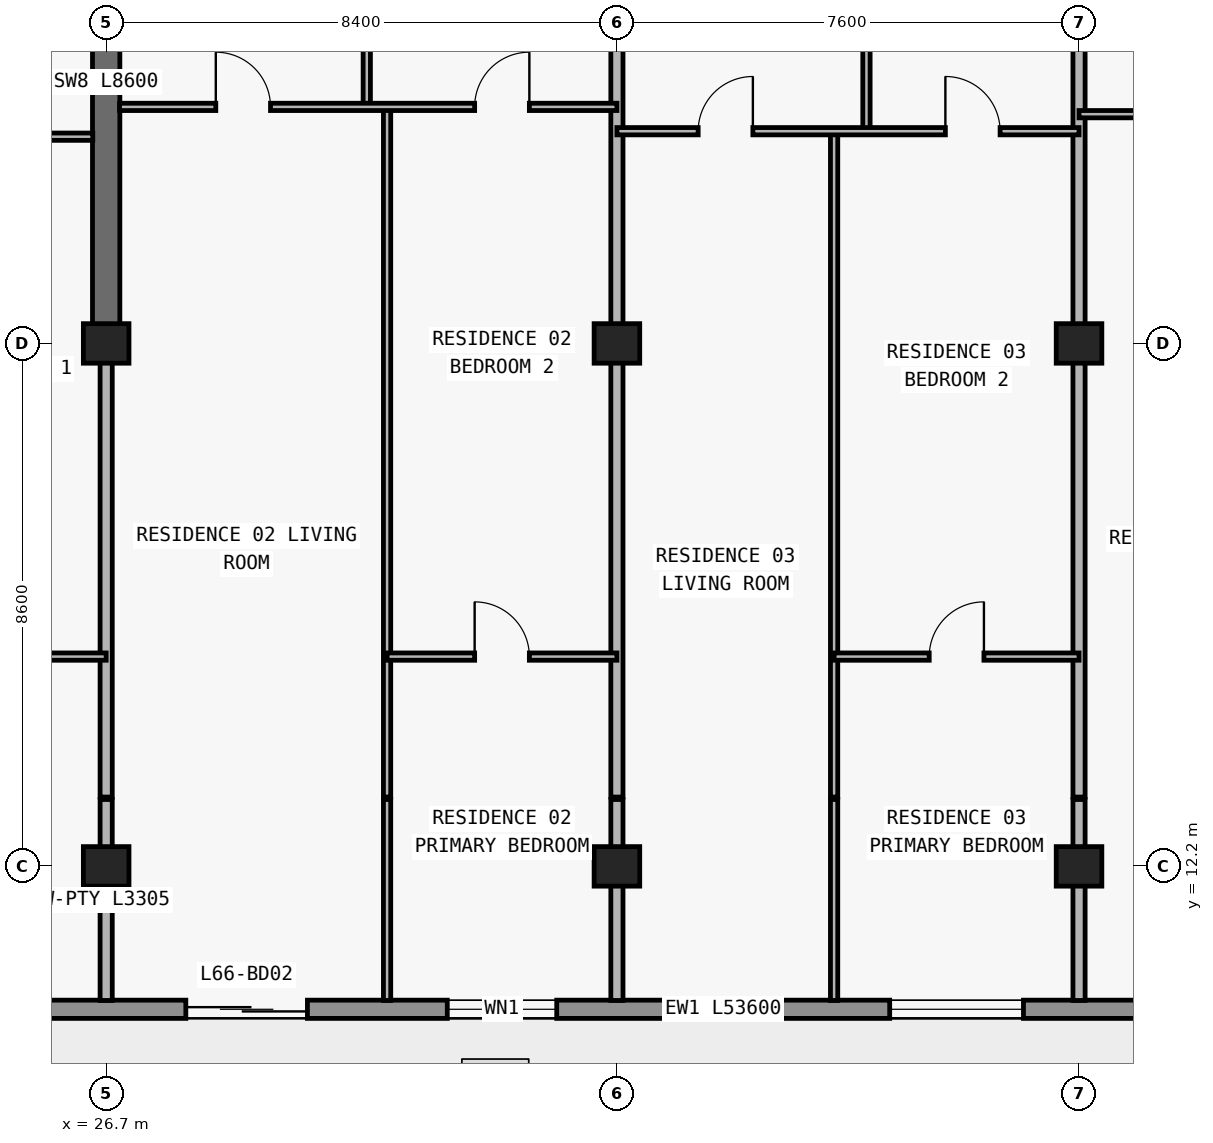
"""IFC4 building model, lengths in metres.
Left out: names, types, materials, properties, quantities, classifications, styles, units other than length and angle.
Written with IfcOpenShell. Run it as: python <this file> out.ifc"""

import sys

from ifc_helpers import new_model, si_unit, direction, frame, frame_2d, origin, origin_2d, place, context, subcontext, project, spatial, rectangle, extrude, element, fill, save


model = new_model("IFC4")
c1 = context("Model", 3, precision=1e-05, world=origin(), true_north=direction((0.0, 1.0)))
c2 = subcontext(c1, "Body", "Model", "MODEL_VIEW")
j1 = project(units=[si_unit("LENGTHUNIT", "METRE"), si_unit("PLANEANGLEUNIT", "RADIAN")], contexts=[c1])
p1 = place(None, origin())
s1 = spatial("IfcSite", under=j1, at=p1, CompositionType="ELEMENT")
p2 = place(p1, origin())
s2 = spatial("IfcBuilding", under=s1, at=p2, CompositionType="ELEMENT")
p3 = place(p2, frame((0.0, 0.0, 236.4)))
s3 = spatial("IfcBuildingStorey", under=s2, at=p3, CompositionType="ELEMENT", Elevation=236.4)
for number, where, z_axis, x_axis in (
    (1, (26.7, 12.2, 0.0), (0.0, 0.0, 1.0), (1.0, 0.0, 0.0)),
    (2, (35.1, 12.2, 0.0), (0.0, 0.0, 1.0), (1.0, 0.0, 0.0)),
    (3, (42.7, 12.2, 0.0), (0.0, 0.0, 1.0), (1.0, 0.0, 0.0)),
    (4, (26.7, 20.8, 0.0), (0.0, 0.0, 1.0), (1.0, 0.0, 0.0)),
    (5, (35.1, 20.8, 0.0), (0.0, 0.0, 1.0), (1.0, 0.0, 0.0)),
    (6, (42.7, 20.8, 0.0), (0.0, 0.0, 1.0), (1.0, 0.0, 0.0)),
):
    element("IfcColumn", number, at=place(p3, frame(where, z_axis=z_axis, x_axis=x_axis)), inside=s3, PredefinedType="COLUMN", context=c2, shape_type="SweptSolid", body=[
        extrude(rectangle(XDim=0.75, YDim=0.65, at=origin_2d()), origin(), (0.0, 0.0, 1.0), 3.05),
    ])
p4 = place(p3, frame((26.7, 20.8, 0.0), z_axis=(0.0, 0.0, 1.0), x_axis=(0.0, 1.0, 0.0)))
e7 = element("IfcWall", 7, at=p4, inside=s3, PredefinedType="SHEAR", context=c2, shape_type="SweptSolid", body=[
    extrude(rectangle(XDim=8.6, YDim=0.45, at=frame_2d((4.3, 0.0))), origin(), (0.0, 0.0, 1.0), 3.05),
])
p5 = place(p3, frame((65.7, 9.85, 0.0), z_axis=(0.0, 0.0, 1.0), x_axis=(-1.0, 0.0, 0.0)))
e8 = element("IfcWall", 8, at=p5, inside=s3, PredefinedType="STANDARD", context=c2, shape_type="SweptSolid", body=[
    extrude(rectangle(XDim=53.6, YDim=0.3, at=frame_2d((26.8, 0.0))), origin(), (0.0, 0.0, 1.0), 3.05),
])
p6 = place(p5, frame((49.5, 0.0, 0.0)))
e9 = element("IfcOpeningElement", 9, at=p6, cuts=e8, PredefinedType="OPENING", context=c2, shape_type="SweptSolid", body=[
    extrude(rectangle(XDim=2.0, YDim=2.3, at=frame_2d((1.0, 1.15))), frame((0.0, 0.16, 0.0), z_axis=(0.0, -1.0, 0.0), x_axis=(1.0, 0.0, 0.0)), (0.0, 0.0, 1.0), 0.32),
])
p7 = place(p5, frame((42.1, 0.0, 0.85)))
e10 = element("IfcOpeningElement", 10, at=p7, cuts=e8, PredefinedType="OPENING", context=c2, shape_type="SweptSolid", body=[
    extrude(rectangle(XDim=2.2, YDim=1.55, at=frame_2d((1.1, 0.775))), frame((0.0, 0.16, 0.0), z_axis=(0.0, -1.0, 0.0), x_axis=(1.0, 0.0, 0.0)), (0.0, 0.0, 1.0), 0.32),
])
p8 = place(p5, frame((35.69, 0.0, 0.0)))
e11 = element("IfcOpeningElement", 11, at=p8, cuts=e8, PredefinedType="OPENING", context=c2, shape_type="SweptSolid", body=[
    extrude(rectangle(XDim=2.0, YDim=2.3, at=frame_2d((1.0, 1.15))), frame((0.0, 0.16, 0.0), z_axis=(0.0, -1.0, 0.0), x_axis=(1.0, 0.0, 0.0)), (0.0, 0.0, 1.0), 0.32),
])
p9 = place(p5, frame((31.59, 0.0, 0.85)))
e12 = element("IfcOpeningElement", 12, at=p9, cuts=e8, PredefinedType="OPENING", context=c2, shape_type="SweptSolid", body=[
    extrude(rectangle(XDim=1.8, YDim=1.55, at=frame_2d((0.9, 0.775))), frame((0.0, 0.16, 0.0), z_axis=(0.0, -1.0, 0.0), x_axis=(1.0, 0.0, 0.0)), (0.0, 0.0, 1.0), 0.32),
])
p10 = place(p5, frame((23.914, 0.0, 0.85)))
e13 = element("IfcOpeningElement", 13, at=p10, cuts=e8, PredefinedType="OPENING", context=c2, shape_type="SweptSolid", body=[
    extrude(rectangle(XDim=2.2, YDim=1.55, at=frame_2d((1.1, 0.775))), frame((0.0, 0.16, 0.0), z_axis=(0.0, -1.0, 0.0), x_axis=(1.0, 0.0, 0.0)), (0.0, 0.0, 1.0), 0.32),
])
p11 = place(p5, frame((19.69, 0.0, 0.0)))
e14 = element("IfcOpeningElement", 14, at=p11, cuts=e8, PredefinedType="OPENING", context=c2, shape_type="SweptSolid", body=[
    extrude(rectangle(XDim=2.0, YDim=2.3, at=frame_2d((1.0, 1.15))), frame((0.0, 0.16, 0.0), z_axis=(0.0, -1.0, 0.0), x_axis=(1.0, 0.0, 0.0)), (0.0, 0.0, 1.0), 0.32),
])
p12 = place(p5, frame((15.59, 0.0, 0.85)))
e15 = element("IfcOpeningElement", 15, at=p12, cuts=e8, PredefinedType="OPENING", context=c2, shape_type="SweptSolid", body=[
    extrude(rectangle(XDim=1.8, YDim=1.55, at=frame_2d((0.9, 0.775))), frame((0.0, 0.16, 0.0), z_axis=(0.0, -1.0, 0.0), x_axis=(1.0, 0.0, 0.0)), (0.0, 0.0, 1.0), 0.32),
])
p13 = place(p5, frame((11.69, 0.0, 0.0)))
e16 = element("IfcOpeningElement", 16, at=p13, cuts=e8, PredefinedType="OPENING", context=c2, shape_type="SweptSolid", body=[
    extrude(rectangle(XDim=2.0, YDim=2.3, at=frame_2d((1.0, 1.15))), frame((0.0, 0.16, 0.0), z_axis=(0.0, -1.0, 0.0), x_axis=(1.0, 0.0, 0.0)), (0.0, 0.0, 1.0), 0.32),
])
p14 = place(p5, frame((7.01, 0.0, 0.65)))
e17 = element("IfcOpeningElement", 17, at=p14, cuts=e8, PredefinedType="OPENING", context=c2, shape_type="SweptSolid", body=[
    extrude(rectangle(XDim=2.6, YDim=1.85, at=frame_2d((1.3, 0.925))), frame((0.0, 0.16, 0.0), z_axis=(0.0, -1.0, 0.0), x_axis=(1.0, 0.0, 0.0)), (0.0, 0.0, 1.0), 0.32),
])
p15 = place(p5, frame((2.0, 0.0, 0.85)))
e18 = element("IfcOpeningElement", 18, at=p15, cuts=e8, PredefinedType="OPENING", context=c2, shape_type="SweptSolid", body=[
    extrude(rectangle(XDim=2.2, YDim=1.55, at=frame_2d((1.1, 0.775))), frame((0.0, 0.16, 0.0), z_axis=(0.0, -1.0, 0.0), x_axis=(1.0, 0.0, 0.0)), (0.0, 0.0, 1.0), 0.32),
])
p16 = place(p3, frame((26.7, 9.995, 0.0), z_axis=(0.0, 0.0, 1.0), x_axis=(0.0, 1.0, 0.0)))
e19 = element("IfcWall", 19, at=p16, inside=s3, PredefinedType="PARTITIONING", context=c2, shape_type="SweptSolid", body=[
    extrude(rectangle(XDim=3.305, YDim=0.2, at=frame_2d((1.652, 0.0))), origin(), (0.0, 0.0, 1.0), 2.263),
])
p17 = place(p3, frame((26.7, 13.34, 0.0), z_axis=(0.0, 0.0, 1.0), x_axis=(0.0, 1.0, 0.0)))
e20 = element("IfcWall", 20, at=p17, inside=s3, PredefinedType="PARTITIONING", context=c2, shape_type="SweptSolid", body=[
    extrude(rectangle(XDim=7.455, YDim=0.2, at=frame_2d((3.728, 0.0))), origin(), (0.0, 0.0, 1.0), 2.263),
])
p18 = place(p3, frame((30.986, 24.69, 0.0), z_axis=(0.0, 0.0, 1.0), x_axis=(0.0, 1.0, 0.0)))
e21 = element("IfcWall", 21, at=p18, inside=s3, PredefinedType="PARTITIONING", context=c2, shape_type="SweptSolid", body=[
    extrude(rectangle(XDim=4.71, YDim=0.12, at=frame_2d((2.355, 0.0))), origin(), (0.0, 0.0, 1.0), 3.05),
])
p19 = place(p18, frame((1.905, 0.0, 0.0)))
e22 = element("IfcOpeningElement", 22, at=p19, cuts=e21, PredefinedType="OPENING", context=c2, shape_type="SweptSolid", body=[
    extrude(rectangle(XDim=0.9, YDim=2.15, at=frame_2d((0.45, 1.075))), frame((0.0, 0.07, 0.0), z_axis=(0.0, -1.0, 0.0), x_axis=(1.0, 0.0, 0.0)), (0.0, 0.0, 1.0), 0.14),
])
p20 = place(p3, frame((31.32, 9.995, 0.0), z_axis=(0.0, 0.0, 1.0), x_axis=(0.0, 1.0, 0.0)))
e23 = element("IfcWall", 23, at=p20, inside=s3, PredefinedType="PARTITIONING", context=c2, shape_type="SweptSolid", body=[
    extrude(rectangle(XDim=3.305, YDim=0.12, at=frame_2d((1.652, 0.0))), origin(), (0.0, 0.0, 1.0), 3.05),
])
p21 = place(p3, frame((31.32, 13.34, 0.0), z_axis=(0.0, 0.0, 1.0), x_axis=(0.0, 1.0, 0.0)))
e24 = element("IfcWall", 24, at=p21, inside=s3, PredefinedType="PARTITIONING", context=c2, shape_type="SweptSolid", body=[
    extrude(rectangle(XDim=11.35, YDim=0.12, at=frame_2d((5.675, 0.0))), origin(), (0.0, 0.0, 1.0), 3.05),
])
p22 = place(p3, frame((35.1, 9.995, 0.0), z_axis=(0.0, 0.0, 1.0), x_axis=(0.0, 1.0, 0.0)))
e25 = element("IfcWall", 25, at=p22, inside=s3, PredefinedType="PARTITIONING", context=c2, shape_type="SweptSolid", body=[
    extrude(rectangle(XDim=3.305, YDim=0.2, at=frame_2d((1.652, 0.0))), origin(), (0.0, 0.0, 1.0), 2.263),
])
p23 = place(p3, frame((35.1, 13.34, 0.0), z_axis=(0.0, 0.0, 1.0), x_axis=(0.0, 1.0, 0.0)))
e26 = element("IfcWall", 26, at=p23, inside=s3, PredefinedType="PARTITIONING", context=c2, shape_type="SweptSolid", body=[
    extrude(rectangle(XDim=16.06, YDim=0.2, at=frame_2d((8.03, 0.0))), origin(), (0.0, 0.0, 1.0), 2.263),
])
p24 = place(p3, frame((38.672, 9.995, 0.0), z_axis=(0.0, 0.0, 1.0), x_axis=(0.0, 1.0, 0.0)))
e27 = element("IfcWall", 27, at=p24, inside=s3, PredefinedType="PARTITIONING", context=c2, shape_type="SweptSolid", body=[
    extrude(rectangle(XDim=3.305, YDim=0.12, at=frame_2d((1.652, 0.0))), origin(), (0.0, 0.0, 1.0), 3.05),
])
p25 = place(p3, frame((38.672, 13.34, 0.0), z_axis=(0.0, 0.0, 1.0), x_axis=(0.0, 1.0, 0.0)))
e28 = element("IfcWall", 28, at=p25, inside=s3, PredefinedType="PARTITIONING", context=c2, shape_type="SweptSolid", body=[
    extrude(rectangle(XDim=10.95, YDim=0.12, at=frame_2d((5.475, 0.0))), origin(), (0.0, 0.0, 1.0), 3.05),
])
p26 = place(p3, frame((39.204, 24.29, 0.0), z_axis=(0.0, 0.0, 1.0), x_axis=(0.0, 1.0, 0.0)))
e29 = element("IfcWall", 29, at=p26, inside=s3, PredefinedType="PARTITIONING", context=c2, shape_type="SweptSolid", body=[
    extrude(rectangle(XDim=5.11, YDim=0.12, at=frame_2d((2.555, 0.0))), origin(), (0.0, 0.0, 1.0), 3.05),
])
p27 = place(p26, frame((2.105, 0.0, 0.0)))
e30 = element("IfcOpeningElement", 30, at=p27, cuts=e29, PredefinedType="OPENING", context=c2, shape_type="SweptSolid", body=[
    extrude(rectangle(XDim=0.9, YDim=2.15, at=frame_2d((0.45, 1.075))), frame((0.0, 0.07, 0.0), z_axis=(0.0, -1.0, 0.0), x_axis=(1.0, 0.0, 0.0)), (0.0, 0.0, 1.0), 0.14),
])
p28 = place(p3, frame((42.7, 9.995, 0.0), z_axis=(0.0, 0.0, 1.0), x_axis=(0.0, 1.0, 0.0)))
e31 = element("IfcWall", 31, at=p28, inside=s3, PredefinedType="PARTITIONING", context=c2, shape_type="SweptSolid", body=[
    extrude(rectangle(XDim=3.305, YDim=0.2, at=frame_2d((1.652, 0.0))), origin(), (0.0, 0.0, 1.0), 2.263),
])
p29 = place(p3, frame((42.7, 13.34, 0.0), z_axis=(0.0, 0.0, 1.0), x_axis=(0.0, 1.0, 0.0)))
e32 = element("IfcWall", 32, at=p29, inside=s3, PredefinedType="PARTITIONING", context=c2, shape_type="SweptSolid", body=[
    extrude(rectangle(XDim=16.06, YDim=0.2, at=frame_2d((8.03, 0.0))), origin(), (0.0, 0.0, 1.0), 2.263),
])
p30 = place(p3, frame((18.3, 15.65, 0.0), z_axis=(0.0, 0.0, 1.0), x_axis=(1.0, 0.0, 0.0)))
e33 = element("IfcWall", 33, at=p30, inside=s3, PredefinedType="PARTITIONING", context=c2, shape_type="SweptSolid", body=[
    extrude(rectangle(XDim=8.4, YDim=0.12, at=frame_2d((4.2, 0.0))), origin(), (0.0, 0.0, 1.0), 3.05),
])
p31 = place(p30, frame((3.75, 0.0, 0.0)))
e34 = element("IfcOpeningElement", 34, at=p31, cuts=e33, PredefinedType="OPENING", context=c2, shape_type="SweptSolid", body=[
    extrude(rectangle(XDim=0.9, YDim=2.15, at=frame_2d((0.45, 1.075))), frame((0.0, 0.07, 0.0), z_axis=(0.0, -1.0, 0.0), x_axis=(1.0, 0.0, 0.0)), (0.0, 0.0, 1.0), 0.14),
])
p32 = place(p3, frame((31.32, 15.65, 0.0), z_axis=(0.0, 0.0, 1.0), x_axis=(1.0, 0.0, 0.0)))
e35 = element("IfcWall", 35, at=p32, inside=s3, PredefinedType="PARTITIONING", context=c2, shape_type="SweptSolid", body=[
    extrude(rectangle(XDim=3.78, YDim=0.12, at=frame_2d((1.89, 0.0))), origin(), (0.0, 0.0, 1.0), 3.05),
])
p33 = place(p32, frame((1.44, 0.0, 0.0)))
e36 = element("IfcOpeningElement", 36, at=p33, cuts=e35, PredefinedType="OPENING", context=c2, shape_type="SweptSolid", body=[
    extrude(rectangle(XDim=0.9, YDim=2.15, at=frame_2d((0.45, 1.075))), frame((0.0, 0.07, 0.0), z_axis=(0.0, -1.0, 0.0), x_axis=(1.0, 0.0, 0.0)), (0.0, 0.0, 1.0), 0.14),
])
p34 = place(p3, frame((38.672, 15.65, 0.0), z_axis=(0.0, 0.0, 1.0), x_axis=(1.0, 0.0, 0.0)))
e37 = element("IfcWall", 37, at=p34, inside=s3, PredefinedType="PARTITIONING", context=c2, shape_type="SweptSolid", body=[
    extrude(rectangle(XDim=4.028, YDim=0.12, at=frame_2d((2.014, 0.0))), origin(), (0.0, 0.0, 1.0), 3.05),
])
p35 = place(p34, frame((1.564, 0.0, 0.0)))
e38 = element("IfcOpeningElement", 38, at=p35, cuts=e37, PredefinedType="OPENING", context=c2, shape_type="SweptSolid", body=[
    extrude(rectangle(XDim=0.9, YDim=2.15, at=frame_2d((0.45, 1.075))), frame((0.0, 0.07, 0.0), z_axis=(0.0, -1.0, 0.0), x_axis=(1.0, 0.0, 0.0)), (0.0, 0.0, 1.0), 0.14),
])
p36 = place(p3, frame((18.305, 24.2, 0.0), z_axis=(0.0, 0.0, 1.0), x_axis=(1.0, 0.0, 0.0)))
e39 = element("IfcWall", 39, at=p36, inside=s3, PredefinedType="PARTITIONING", context=c2, shape_type="SweptSolid", body=[
    extrude(rectangle(XDim=8.175, YDim=0.12, at=frame_2d((4.087, 0.0))), origin(), (0.0, 0.0, 1.0), 3.05),
])
p37 = place(p36, frame((3.637, 0.0, 0.0)))
e40 = element("IfcOpeningElement", 40, at=p37, cuts=e39, PredefinedType="OPENING", context=c2, shape_type="SweptSolid", body=[
    extrude(rectangle(XDim=0.9, YDim=2.15, at=frame_2d((0.45, 1.075))), frame((0.0, 0.07, 0.0), z_axis=(0.0, -1.0, 0.0), x_axis=(1.0, 0.0, 0.0)), (0.0, 0.0, 1.0), 0.14),
])
p38 = place(p3, frame((35.1, 24.29, 0.0), z_axis=(0.0, 0.0, 1.0), x_axis=(1.0, 0.0, 0.0)))
e41 = element("IfcWall", 41, at=p38, inside=s3, PredefinedType="PARTITIONING", context=c2, shape_type="SweptSolid", body=[
    extrude(rectangle(XDim=7.6, YDim=0.12, at=frame_2d((3.8, 0.0))), origin(), (0.0, 0.0, 1.0), 3.05),
])
p39 = place(p38, frame((1.336, 0.0, 0.0)))
e42 = element("IfcOpeningElement", 42, at=p39, cuts=e41, PredefinedType="OPENING", context=c2, shape_type="SweptSolid", body=[
    extrude(rectangle(XDim=0.9, YDim=2.15, at=frame_2d((0.45, 1.075))), frame((0.0, 0.07, 0.0), z_axis=(0.0, -1.0, 0.0), x_axis=(1.0, 0.0, 0.0)), (0.0, 0.0, 1.0), 0.14),
])
p40 = place(p38, frame((5.402, 0.0, 0.0)))
e43 = element("IfcOpeningElement", 43, at=p40, cuts=e41, PredefinedType="OPENING", context=c2, shape_type="SweptSolid", body=[
    extrude(rectangle(XDim=0.9, YDim=2.15, at=frame_2d((0.45, 1.075))), frame((0.0, 0.07, 0.0), z_axis=(0.0, -1.0, 0.0), x_axis=(1.0, 0.0, 0.0)), (0.0, 0.0, 1.0), 0.14),
])
p41 = place(p3, frame((42.7, 24.57, 0.0), z_axis=(0.0, 0.0, 1.0), x_axis=(1.0, 0.0, 0.0)))
e44 = element("IfcWall", 44, at=p41, inside=s3, PredefinedType="PARTITIONING", context=c2, shape_type="SweptSolid", body=[
    extrude(rectangle(XDim=8.18, YDim=0.12, at=frame_2d((4.09, 0.0))), origin(), (0.0, 0.0, 1.0), 3.05),
])
p42 = place(p41, frame((1.86, 0.0, 0.0)))
e45 = element("IfcOpeningElement", 45, at=p42, cuts=e44, PredefinedType="OPENING", context=c2, shape_type="SweptSolid", body=[
    extrude(rectangle(XDim=0.9, YDim=2.15, at=frame_2d((0.45, 1.075))), frame((0.0, 0.07, 0.0), z_axis=(0.0, -1.0, 0.0), x_axis=(1.0, 0.0, 0.0)), (0.0, 0.0, 1.0), 0.14),
])
p43 = place(p41, frame((6.033, 0.0, 0.0)))
e46 = element("IfcOpeningElement", 46, at=p43, cuts=e44, PredefinedType="OPENING", context=c2, shape_type="SweptSolid", body=[
    extrude(rectangle(XDim=0.9, YDim=2.15, at=frame_2d((0.45, 1.075))), frame((0.0, 0.07, 0.0), z_axis=(0.0, -1.0, 0.0), x_axis=(1.0, 0.0, 0.0)), (0.0, 0.0, 1.0), 0.14),
])
p44 = place(p3, frame((26.92, 24.69, 0.0), z_axis=(0.0, 0.0, 1.0), x_axis=(1.0, 0.0, 0.0)))
e47 = element("IfcWall", 47, at=p44, inside=s3, PredefinedType="PARTITIONING", context=c2, shape_type="SweptSolid", body=[
    extrude(rectangle(XDim=8.18, YDim=0.12, at=frame_2d((4.09, 0.0))), origin(), (0.0, 0.0, 1.0), 3.05),
])
p45 = place(p44, frame((1.583, 0.0, 0.0)))
e48 = element("IfcOpeningElement", 48, at=p45, cuts=e47, PredefinedType="OPENING", context=c2, shape_type="SweptSolid", body=[
    extrude(rectangle(XDim=0.9, YDim=2.15, at=frame_2d((0.45, 1.075))), frame((0.0, 0.07, 0.0), z_axis=(0.0, -1.0, 0.0), x_axis=(1.0, 0.0, 0.0)), (0.0, 0.0, 1.0), 0.14),
])
p46 = place(p44, frame((5.84, 0.0, 0.0)))
e49 = element("IfcOpeningElement", 49, at=p46, cuts=e47, PredefinedType="OPENING", context=c2, shape_type="SweptSolid", body=[
    extrude(rectangle(XDim=0.9, YDim=2.15, at=frame_2d((0.45, 1.075))), frame((0.0, 0.07, 0.0), z_axis=(0.0, -1.0, 0.0), x_axis=(1.0, 0.0, 0.0)), (0.0, 0.0, 1.0), 0.14),
])
p47 = place(p8, origin())
e50 = element("IfcDoor", 50, at=p47, inside=s3, OperationType="DOUBLE_DOOR_SLIDING", PredefinedType="DOOR", context=c2, shape_type="SweptSolid", body=[
    extrude(rectangle(XDim=2.0, YDim=2.3, at=frame_2d((1.0, 1.15))), frame((0.0, 0.025, 0.0), z_axis=(0.0, -1.0, 0.0), x_axis=(1.0, 0.0, 0.0)), (0.0, 0.0, 1.0), 0.05),
])
fill(e11, e50)
p48 = place(p9, origin())
e51 = element("IfcWindow", 51, at=p48, inside=s3, PartitioningType="SINGLE_PANEL", PredefinedType="WINDOW", context=c2, shape_type="SweptSolid", body=[
    extrude(rectangle(XDim=1.8, YDim=1.55, at=frame_2d((0.9, 0.775))), frame((0.0, 0.03, 0.0), z_axis=(0.0, -1.0, 0.0), x_axis=(1.0, 0.0, 0.0)), (0.0, 0.0, 1.0), 0.06),
])
fill(e12, e51)
p49 = place(p10, origin())
e52 = element("IfcWindow", 52, at=p49, inside=s3, PartitioningType="SINGLE_PANEL", PredefinedType="WINDOW", context=c2, shape_type="SweptSolid", body=[
    extrude(rectangle(XDim=2.2, YDim=1.55, at=frame_2d((1.1, 0.775))), frame((0.0, 0.03, 0.0), z_axis=(0.0, -1.0, 0.0), x_axis=(1.0, 0.0, 0.0)), (0.0, 0.0, 1.0), 0.06),
])
fill(e13, e52)
p50 = place(p45, origin())
e53 = element("IfcDoor", 53, at=p50, inside=s3, OperationType="SINGLE_SWING_LEFT", PredefinedType="DOOR", context=c2, shape_type="SweptSolid", body=[
    extrude(rectangle(XDim=0.9, YDim=2.15, at=frame_2d((0.45, 1.075))), frame((0.0, 0.025, 0.0), z_axis=(0.0, -1.0, 0.0), x_axis=(1.0, 0.0, 0.0)), (0.0, 0.0, 1.0), 0.05),
])
fill(e48, e53)
p51 = place(p46, origin())
e54 = element("IfcDoor", 54, at=p51, inside=s3, OperationType="SINGLE_SWING_RIGHT", PredefinedType="DOOR", context=c2, shape_type="SweptSolid", body=[
    extrude(rectangle(XDim=0.9, YDim=2.15, at=frame_2d((0.45, 1.075))), frame((0.0, 0.025, 0.0), z_axis=(0.0, -1.0, 0.0), x_axis=(1.0, 0.0, 0.0)), (0.0, 0.0, 1.0), 0.05),
])
fill(e49, e54)
p52 = place(p33, origin())
e55 = element("IfcDoor", 55, at=p52, inside=s3, OperationType="SINGLE_SWING_LEFT", PredefinedType="DOOR", context=c2, shape_type="SweptSolid", body=[
    extrude(rectangle(XDim=0.9, YDim=2.15, at=frame_2d((0.45, 1.075))), frame((0.0, 0.025, 0.0), z_axis=(0.0, -1.0, 0.0), x_axis=(1.0, 0.0, 0.0)), (0.0, 0.0, 1.0), 0.05),
])
fill(e36, e55)
p53 = place(p39, origin())
e56 = element("IfcDoor", 56, at=p53, inside=s3, OperationType="SINGLE_SWING_RIGHT", PredefinedType="DOOR", context=c2, shape_type="SweptSolid", body=[
    extrude(rectangle(XDim=0.9, YDim=2.15, at=frame_2d((0.45, 1.075))), frame((0.0, 0.025, 0.0), z_axis=(0.0, -1.0, 0.0), x_axis=(1.0, 0.0, 0.0)), (0.0, 0.0, 1.0), 0.05),
])
fill(e42, e56)
p54 = place(p40, origin())
e57 = element("IfcDoor", 57, at=p54, inside=s3, OperationType="SINGLE_SWING_LEFT", PredefinedType="DOOR", context=c2, shape_type="SweptSolid", body=[
    extrude(rectangle(XDim=0.9, YDim=2.15, at=frame_2d((0.45, 1.075))), frame((0.0, 0.025, 0.0), z_axis=(0.0, -1.0, 0.0), x_axis=(1.0, 0.0, 0.0)), (0.0, 0.0, 1.0), 0.05),
])
fill(e43, e57)
p55 = place(p35, origin())
e58 = element("IfcDoor", 58, at=p55, inside=s3, OperationType="SINGLE_SWING_RIGHT", PredefinedType="DOOR", context=c2, shape_type="SweptSolid", body=[
    extrude(rectangle(XDim=0.9, YDim=2.15, at=frame_2d((0.45, 1.075))), frame((0.0, 0.025, 0.0), z_axis=(0.0, -1.0, 0.0), x_axis=(1.0, 0.0, 0.0)), (0.0, 0.0, 1.0), 0.05),
])
fill(e38, e58)
save(model, sys.argv[1])
